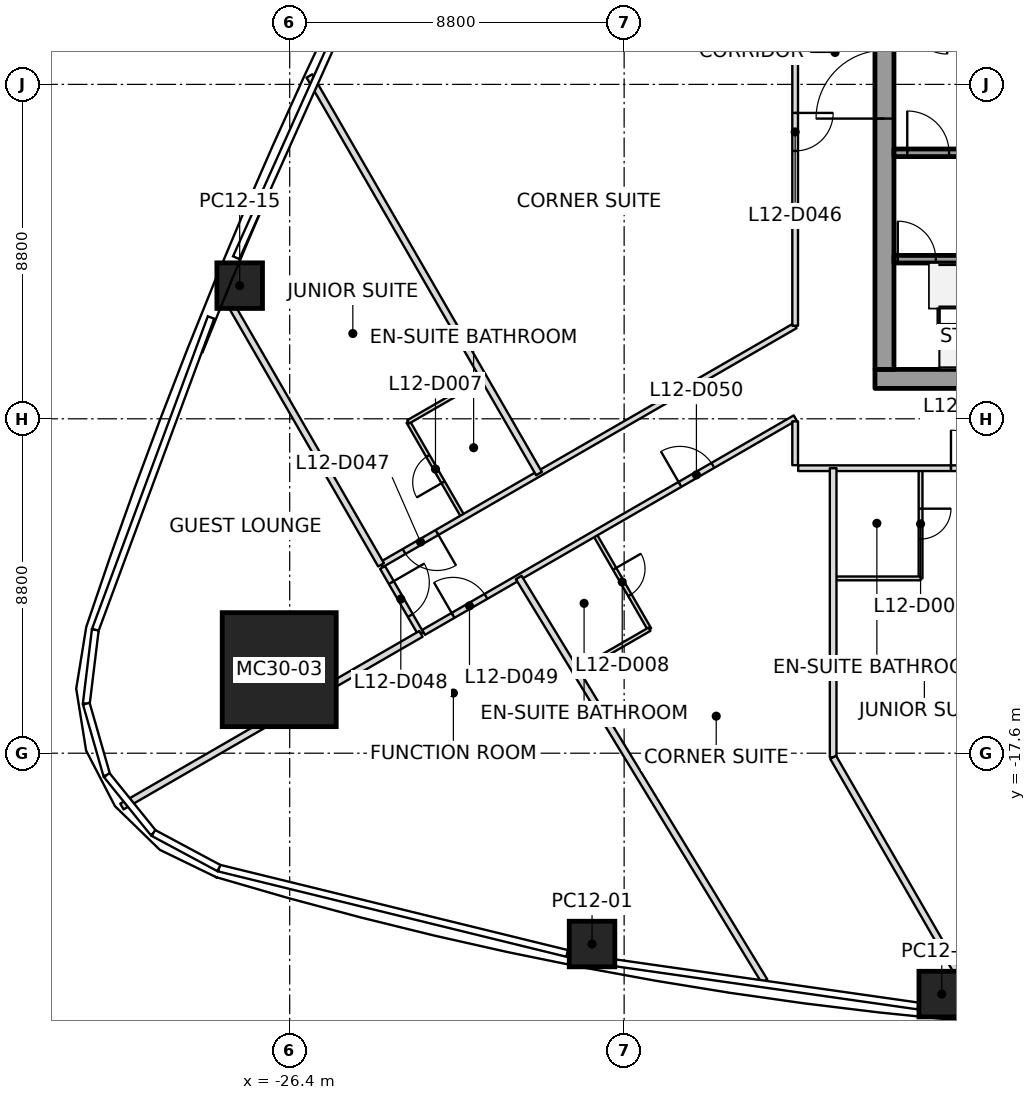
"""IFC4 building model, lengths in metres.
Left out: names, types, materials, properties, quantities, classifications, styles, units other than length and angle.
Written with IfcOpenShell. Run it as: python <this file> out.ifc"""

import sys

from ifc_helpers import new_model, si_unit, direction, frame, frame_2d, origin, origin_2d, place, context, subcontext, project, spatial, rectangle, extrude, clip, halfspace, element, fill, save


model = new_model("IFC4")
c1 = context("Model", 3, precision=1e-05, world=origin(), true_north=direction((0.0, 1.0)))
c2 = subcontext(c1, "Body", "Model", "MODEL_VIEW")
j1 = project(units=[si_unit("LENGTHUNIT", "METRE"), si_unit("PLANEANGLEUNIT", "RADIAN")], contexts=[c1])
p1 = place(None, origin())
s1 = spatial("IfcSite", under=j1, at=p1, CompositionType="ELEMENT")
p2 = place(p1, origin())
s2 = spatial("IfcBuilding", under=s1, at=p2, CompositionType="ELEMENT")
p3 = place(p2, frame((0.0, 0.0, 66.5)))
s3 = spatial("IfcBuildingStorey", under=s2, at=p3, CompositionType="ELEMENT", Elevation=66.5)
p4 = place(p3, frame((-26.676, -15.401, 0.0), z_axis=(0.030531956516, 0.017672925154, 0.999377539946), x_axis=(0.99953379114, -0.000539840661, -0.030527183636)))
e1 = element("IfcColumn", 1, at=p4, inside=s3, PredefinedType="COLUMN", context=c2, shape_type="SweptSolid", body=[
    extrude(rectangle(XDim=3.0, YDim=3.0, at=origin_2d()), origin(), (0.0, 0.0, 1.0), 3.702),
])
p5 = place(p3, frame((-18.445, -22.622, 0.0), z_axis=(0.019018956694, 0.15899066195, 0.987096879085), x_axis=(-0.981890485807, 0.189097653635, -0.011539119147)))
e2 = element("IfcColumn", 2, at=p5, inside=s3, PredefinedType="COLUMN", context=c2, shape_type="SweptSolid", body=[
    clip(clip(extrude(rectangle(XDim=1.2, YDim=1.2, at=origin_2d()), origin(), (0.0, 0.0, 1.0), 3.748), halfspace(frame((0.0, 0.0, 0.006)), True)), halfspace(frame((0.0, 0.0, 3.734)), False)),
])
p6 = place(p3, frame((-9.242, -23.939, 0.0), z_axis=(0.00942953432, 0.204607977573, 0.978798579584), x_axis=(0.990215317111, -0.138199898552, 0.019349775144)))
e3 = element("IfcColumn", 3, at=p6, inside=s3, PredefinedType="COLUMN", context=c2, shape_type="SweptSolid", body=[
    clip(clip(extrude(rectangle(XDim=1.2, YDim=1.2, at=origin_2d()), origin(), (0.0, 0.0, 1.0), 3.78), halfspace(frame((0.0, 0.0, 0.007)), True)), halfspace(frame((0.0, 0.0, 3.762)), False)),
])
p7 = place(p3, frame((-27.716, -5.296, 0.0), z_axis=(0.019460655113, 0.011016709844, 0.999749926235), x_axis=(0.381436993844, 0.924227098821, -0.017609359201)))
e4 = element("IfcColumn", 4, at=p7, inside=s3, PredefinedType="COLUMN", context=c2, shape_type="SweptSolid", body=[
    extrude(rectangle(XDim=1.2, YDim=1.2, at=origin_2d()), origin(), (0.0, 0.0, 1.0), 3.701),
])
p8 = place(p3, frame((-11.0, -7.75, 0.0), z_axis=(0.0, 0.0, 1.0), x_axis=(1.0, 0.0, 0.0)))
e5 = element("IfcWall", 5, at=p8, inside=s3, PredefinedType="SHEAR", context=c2, shape_type="SweptSolid", body=[
    extrude(rectangle(XDim=22.0, YDim=0.5, at=frame_2d((11.0, 0.0))), origin(), (0.0, 0.0, 1.0), 3.7),
])
p9 = place(p8, frame((10.45, 0.0, 0.0)))
e6 = element("IfcOpeningElement", 6, at=p9, cuts=e5, PredefinedType="OPENING", context=c2, shape_type="SweptSolid", body=[
    extrude(rectangle(XDim=1.1, YDim=2.1, at=frame_2d((0.55, 1.05))), frame((0.0, 0.25, 0.0), z_axis=(0.0, -1.0, 0.0), x_axis=(1.0, 0.0, 0.0)), (0.0, 0.0, 1.0), 0.5),
])
p10 = place(p3, frame((-10.75, -7.5, 0.0), z_axis=(0.0, 0.0, 1.0), x_axis=(0.0, 1.0, 0.0)))
e7 = element("IfcWall", 7, at=p10, inside=s3, PredefinedType="SHEAR", context=c2, shape_type="SweptSolid", body=[
    extrude(rectangle(XDim=15.0, YDim=0.5, at=frame_2d((7.5, 0.0))), origin(), (0.0, 0.0, 1.0), 3.7),
])
p11 = place(p10, frame((6.6, 0.0, 0.0)))
e8 = element("IfcOpeningElement", 8, at=p11, cuts=e7, PredefinedType="OPENING", context=c2, shape_type="SweptSolid", body=[
    extrude(rectangle(XDim=1.8, YDim=2.1, at=frame_2d((0.9, 1.05))), frame((0.0, 0.25, 0.0), z_axis=(0.0, -1.0, 0.0), x_axis=(1.0, 0.0, 0.0)), (0.0, 0.0, 1.0), 0.5),
])
p12 = place(p3, frame((-10.5, -4.6, 0.0), z_axis=(0.0, 0.0, 1.0), x_axis=(1.0, 0.0, 0.0)))
e9 = element("IfcWall", 9, at=p12, inside=s3, PredefinedType="SOLIDWALL", context=c2, shape_type="SweptSolid", body=[
    extrude(rectangle(XDim=1.8, YDim=0.2, at=frame_2d((0.9, 0.0))), origin(), (0.0, 0.0, 1.0), 3.55),
])
p13 = place(p12, frame((0.1, 0.0, 0.0)))
e10 = element("IfcOpeningElement", 10, at=p13, cuts=e9, PredefinedType="OPENING", context=c2, shape_type="SweptSolid", body=[
    extrude(rectangle(XDim=1.0, YDim=2.1, at=frame_2d((0.5, 1.05))), frame((0.0, 0.1, 0.0), z_axis=(0.0, -1.0, 0.0), x_axis=(1.0, 0.0, 0.0)), (0.0, 0.0, 1.0), 0.2),
])
p14 = place(p3, frame((-10.5, -1.8, 0.0), z_axis=(0.0, 0.0, 1.0), x_axis=(1.0, 0.0, 0.0)))
e11 = element("IfcWall", 11, at=p14, inside=s3, PredefinedType="SOLIDWALL", context=c2, shape_type="SweptSolid", body=[
    extrude(rectangle(XDim=1.8, YDim=0.2, at=frame_2d((0.9, 0.0))), origin(), (0.0, 0.0, 1.0), 3.55),
])
p15 = place(p14, frame((0.35, 0.0, 0.0)))
e12 = element("IfcOpeningElement", 12, at=p15, cuts=e11, PredefinedType="OPENING", context=c2, shape_type="SweptSolid", body=[
    extrude(rectangle(XDim=1.1, YDim=2.1, at=frame_2d((0.55, 1.05))), frame((0.0, 0.1, 0.0), z_axis=(0.0, -1.0, 0.0), x_axis=(1.0, 0.0, 0.0)), (0.0, 0.0, 1.0), 0.2),
])
p16 = place(p3, frame((-22.947, -14.461, 0.0), z_axis=(0.0, 0.0, 1.0), x_axis=(-0.866030311917, -0.499991498769, 0.0)))
e13 = element("IfcWall", 13, at=p16, inside=s3, PredefinedType="PARTITIONING", context=c2, shape_type="SweptSolid", body=[
    extrude(rectangle(XDim=9.086, YDim=0.175, at=frame_2d((4.543, 0.0))), origin(), (0.0, 0.0, 1.0), 2.934),
])
p17 = place(p3, frame((-23.997, -12.642, 0.0), z_axis=(0.0, 0.0, 1.0), x_axis=(-0.49999045727, 0.866030913212, 0.0)))
e14 = element("IfcWall", 14, at=p17, inside=s3, PredefinedType="PARTITIONING", context=c2, shape_type="SweptSolid", body=[
    extrude(rectangle(XDim=8.543, YDim=0.175, at=frame_2d((4.271, 0.0))), origin(), (0.0, 0.0, 1.0), 2.934),
])
p18 = place(p3, frame((-19.84, -10.242, 0.0), z_axis=(0.0, 0.0, 1.0), x_axis=(-0.499991787927, 0.866030144975, 0.0)))
e15 = element("IfcWall", 15, at=p18, inside=s3, PredefinedType="PARTITIONING", context=c2, shape_type="SweptSolid", body=[
    extrude(rectangle(XDim=12.084, YDim=0.175, at=frame_2d((6.042, 0.0))), origin(), (0.0, 0.0, 1.0), 2.934),
])
p19 = place(p3, frame((-13.908, -23.596, 0.0), z_axis=(0.0, 0.0, 1.0), x_axis=(-0.520049098653, 0.854136367912, 0.0)))
e16 = element("IfcWall", 16, at=p19, inside=s3, PredefinedType="PARTITIONING", context=c2, shape_type="SweptSolid", body=[
    extrude(rectangle(XDim=12.434, YDim=0.175, at=frame_2d((6.217, 0.0))), origin(), (0.0, 0.0, 1.0), 2.934),
])
p20 = place(p3, frame((-12.1, -10.1, 0.0), z_axis=(0.0, 0.0, 1.0), x_axis=(0.0, -1.0, 0.0)))
e17 = element("IfcWall", 17, at=p20, inside=s3, PredefinedType="PARTITIONING", context=c2, shape_type="SweptSolid", body=[
    extrude(rectangle(XDim=7.608, YDim=0.175, at=frame_2d((3.804, 0.0))), origin(), (0.0, 0.0, 1.0), 3.15),
])
p21 = place(p3, frame((-12.1, -17.708, 0.0), z_axis=(0.0, 0.0, 1.0), x_axis=(0.500006299954, -0.866021766474, 0.0)))
e18 = element("IfcWall", 18, at=p21, inside=s3, PredefinedType="PARTITIONING", context=c2, shape_type="SweptSolid", body=[
    extrude(rectangle(XDim=7.917, YDim=0.175, at=frame_2d((3.958, 0.0))), origin(), (0.0, 0.0, 1.0), 3.15),
])
p22 = place(p3, frame((-13.1, -6.351, 0.0), z_axis=(0.0, 0.0, 1.0), x_axis=(-0.86601949893, -0.500010227369, 0.0)))
e19 = element("IfcWall", 19, at=p22, inside=s3, PredefinedType="PARTITIONING", context=c2, shape_type="SweptSolid", body=[
    extrude(rectangle(XDim=12.582, YDim=0.15, at=frame_2d((6.291, 0.0))), origin(), (0.0, 0.0, 1.0), 2.947),
])
p23 = place(p22, frame((10.882, 0.0, 0.0)))
e20 = element("IfcOpeningElement", 20, at=p23, cuts=e19, PredefinedType="OPENING", context=c2, shape_type="SweptSolid", body=[
    extrude(rectangle(XDim=1.0, YDim=2.1, at=frame_2d((0.5, 1.05))), frame((0.0, 0.075, 0.0), z_axis=(0.0, -1.0, 0.0), x_axis=(1.0, 0.0, 0.0)), (0.0, 0.0, 1.0), 0.15),
])
p24 = place(p3, frame((-23.957, -12.711, 0.0), z_axis=(0.0, 0.0, 1.0), x_axis=(0.499973530083, -0.866040685659, 0.0)))
e21 = element("IfcWall", 21, at=p24, inside=s3, PredefinedType="PARTITIONING", context=c2, shape_type="SweptSolid", body=[
    extrude(rectangle(XDim=2.02, YDim=0.15, at=frame_2d((1.01, 0.0))), origin(), (0.0, 0.0, 1.0), 2.797),
])
p25 = place(p24, frame((0.46, 0.0, 0.0)))
e22 = element("IfcOpeningElement", 22, at=p25, cuts=e21, PredefinedType="OPENING", context=c2, shape_type="SweptSolid", body=[
    extrude(rectangle(XDim=1.0, YDim=2.1, at=frame_2d((0.5, 1.05))), frame((0.0, 0.075, 0.0), z_axis=(0.0, -1.0, 0.0), x_axis=(1.0, 0.0, 0.0)), (0.0, 0.0, 1.0), 0.15),
])
p26 = place(p3, frame((-22.877, -14.421, 0.0), z_axis=(0.0, 0.0, 1.0), x_axis=(0.86601740905, 0.500013847031, 0.0)))
e23 = element("IfcWall", 23, at=p26, inside=s3, PredefinedType="PARTITIONING", context=c2, shape_type="SweptSolid", body=[
    extrude(rectangle(XDim=11.29, YDim=0.15, at=frame_2d((5.645, 0.0))), origin(), (0.0, 0.0, 1.0), 2.797),
])
p27 = place(p26, frame((0.895, 0.0, 0.0)))
e24 = element("IfcOpeningElement", 24, at=p27, cuts=e23, PredefinedType="OPENING", context=c2, shape_type="SweptSolid", body=[
    extrude(rectangle(XDim=1.0, YDim=2.1, at=frame_2d((0.5, 1.05))), frame((0.0, 0.075, 0.0), z_axis=(0.0, -1.0, 0.0), x_axis=(1.0, 0.0, 0.0)), (0.0, 0.0, 1.0), 0.15),
])
p28 = place(p26, frame((7.79, 0.0, 0.0)))
e25 = element("IfcOpeningElement", 25, at=p28, cuts=e23, PredefinedType="OPENING", context=c2, shape_type="SweptSolid", body=[
    extrude(rectangle(XDim=1.0, YDim=2.1, at=frame_2d((0.5, 1.05))), frame((0.0, 0.075, 0.0), z_axis=(0.0, -1.0, 0.0), x_axis=(1.0, 0.0, 0.0)), (0.0, 0.0, 1.0), 0.15),
])
p29 = place(p3, frame((-13.1, -8.867, 0.0), z_axis=(0.0, 0.0, 1.0), x_axis=(0.0, -1.0, 0.0)))
e26 = element("IfcWall", 26, at=p29, inside=s3, PredefinedType="PARTITIONING", context=c2, shape_type="SweptSolid", body=[
    extrude(rectangle(XDim=1.153, YDim=0.15, at=frame_2d((0.576, 0.0))), origin(), (0.0, 0.0, 1.0), 2.797),
])
p30 = place(p3, frame((-13.1, 10.02, 0.0), z_axis=(0.0, 0.0, 1.0), x_axis=(0.0, -1.0, 0.0)))
e27 = element("IfcWall", 27, at=p30, inside=s3, PredefinedType="PARTITIONING", context=c2, shape_type="SweptSolid", body=[
    extrude(rectangle(XDim=16.371, YDim=0.15, at=frame_2d((8.186, 0.0))), origin(), (0.0, 0.0, 1.0), 3.017),
])
p31 = place(p30, frame((2.545, 0.0, 0.0)))
e28 = element("IfcOpeningElement", 28, at=p31, cuts=e27, PredefinedType="OPENING", context=c2, shape_type="SweptSolid", body=[
    extrude(rectangle(XDim=1.0, YDim=2.1, at=frame_2d((0.5, 1.05))), frame((0.0, 0.075, 0.0), z_axis=(0.0, -1.0, 0.0), x_axis=(1.0, 0.0, 0.0)), (0.0, 0.0, 1.0), 0.15),
])
p32 = place(p30, frame((10.771, 0.0, 0.0)))
e29 = element("IfcOpeningElement", 29, at=p32, cuts=e27, PredefinedType="OPENING", context=c2, shape_type="SweptSolid", body=[
    extrude(rectangle(XDim=1.0, YDim=2.1, at=frame_2d((0.5, 1.05))), frame((0.0, 0.075, 0.0), z_axis=(0.0, -1.0, 0.0), x_axis=(1.0, 0.0, 0.0)), (0.0, 0.0, 1.0), 0.15),
])
p33 = place(p3, frame((-13.02, -10.1, 0.0), z_axis=(0.0, 0.0, 1.0), x_axis=(1.0, 0.0, 0.0)))
e30 = element("IfcWall", 30, at=p33, inside=s3, PredefinedType="PARTITIONING", context=c2, shape_type="SweptSolid", body=[
    extrude(rectangle(XDim=26.04, YDim=0.15, at=frame_2d((13.02, 0.0))), origin(), (0.0, 0.0, 1.0), 2.947),
])
p34 = place(p33, frame((4.02, 0.0, 0.0)))
e31 = element("IfcOpeningElement", 31, at=p34, cuts=e30, PredefinedType="OPENING", context=c2, shape_type="SweptSolid", body=[
    extrude(rectangle(XDim=1.0, YDim=2.1, at=frame_2d((0.5, 1.05))), frame((0.0, 0.075, 0.0), z_axis=(0.0, -1.0, 0.0), x_axis=(1.0, 0.0, 0.0)), (0.0, 0.0, 1.0), 0.15),
])
p35 = place(p33, frame((7.02, 0.0, 0.0)))
e32 = element("IfcOpeningElement", 32, at=p35, cuts=e30, PredefinedType="OPENING", context=c2, shape_type="SweptSolid", body=[
    extrude(rectangle(XDim=1.0, YDim=2.1, at=frame_2d((0.5, 1.05))), frame((0.0, 0.075, 0.0), z_axis=(0.0, -1.0, 0.0), x_axis=(1.0, 0.0, 0.0)), (0.0, 0.0, 1.0), 0.15),
])
p36 = place(p33, frame((12.12, 0.0, 0.0)))
e33 = element("IfcOpeningElement", 33, at=p36, cuts=e30, PredefinedType="OPENING", context=c2, shape_type="SweptSolid", body=[
    extrude(rectangle(XDim=1.0, YDim=2.1, at=frame_2d((0.5, 1.05))), frame((0.0, 0.075, 0.0), z_axis=(0.0, -1.0, 0.0), x_axis=(1.0, 0.0, 0.0)), (0.0, 0.0, 1.0), 0.15),
])
p37 = place(p33, frame((16.62, 0.0, 0.0)))
e34 = element("IfcOpeningElement", 34, at=p37, cuts=e30, PredefinedType="OPENING", context=c2, shape_type="SweptSolid", body=[
    extrude(rectangle(XDim=1.0, YDim=2.1, at=frame_2d((0.5, 1.05))), frame((0.0, 0.075, 0.0), z_axis=(0.0, -1.0, 0.0), x_axis=(1.0, 0.0, 0.0)), (0.0, 0.0, 1.0), 0.15),
])
p38 = place(p33, frame((19.62, 0.0, 0.0)))
e35 = element("IfcOpeningElement", 35, at=p38, cuts=e30, PredefinedType="OPENING", context=c2, shape_type="SweptSolid", body=[
    extrude(rectangle(XDim=1.0, YDim=2.1, at=frame_2d((0.5, 1.05))), frame((0.0, 0.075, 0.0), z_axis=(0.0, -1.0, 0.0), x_axis=(1.0, 0.0, 0.0)), (0.0, 0.0, 1.0), 0.15),
])
p39 = place(p3, frame((-21.846, -11.366, 0.0), z_axis=(0.0, 0.0, 1.0), x_axis=(-0.500036638401, 0.866004249561, 0.0)))
e36 = element("IfcWall", 36, at=p39, inside=s3, PredefinedType="PARTITIONING", context=c2, shape_type="SweptSolid", body=[
    extrude(rectangle(XDim=2.87, YDim=0.1, at=frame_2d((1.435, 0.0))), origin(), (0.0, 0.0, 1.0), 3.15),
])
p40 = place(p39, frame((1.035, 0.0, 0.0)))
e37 = element("IfcOpeningElement", 37, at=p40, cuts=e36, PredefinedType="OPENING", context=c2, shape_type="SweptSolid", body=[
    extrude(rectangle(XDim=0.8, YDim=2.1, at=frame_2d((0.4, 1.05))), frame((0.0, 0.05, 0.0), z_axis=(0.0, -1.0, 0.0), x_axis=(1.0, 0.0, 0.0)), (0.0, 0.0, 1.0), 0.1),
])
p41 = place(p3, frame((-23.281, -8.881, 0.0), z_axis=(0.0, 0.0, 1.0), x_axis=(0.866017224141, 0.500014167291, 0.0)))
e38 = element("IfcWall", 38, at=p41, inside=s3, PredefinedType="PARTITIONING", context=c2, shape_type="SweptSolid", body=[
    extrude(rectangle(XDim=2.27, YDim=0.1, at=frame_2d((1.135, 0.0))), origin(), (0.0, 0.0, 1.0), 3.15),
])
p42 = place(p3, frame((-18.368, -11.852, 0.0), z_axis=(0.0, 0.0, 1.0), x_axis=(0.500036638401, -0.866004249561, 0.0)))
e39 = element("IfcWall", 39, at=p42, inside=s3, PredefinedType="PARTITIONING", context=c2, shape_type="SweptSolid", body=[
    extrude(rectangle(XDim=2.87, YDim=0.1, at=frame_2d((1.435, 0.0))), origin(), (0.0, 0.0, 1.0), 3.15),
])
p43 = place(p42, frame((1.035, 0.0, 0.0)))
e40 = element("IfcOpeningElement", 40, at=p43, cuts=e39, PredefinedType="OPENING", context=c2, shape_type="SweptSolid", body=[
    extrude(rectangle(XDim=0.8, YDim=2.1, at=frame_2d((0.4, 1.05))), frame((0.0, 0.05, 0.0), z_axis=(0.0, -1.0, 0.0), x_axis=(1.0, 0.0, 0.0)), (0.0, 0.0, 1.0), 0.1),
])
p44 = place(p3, frame((-16.933, -14.337, 0.0), z_axis=(0.0, 0.0, 1.0), x_axis=(-0.866017224141, -0.500014167291, 0.0)))
e41 = element("IfcWall", 41, at=p44, inside=s3, PredefinedType="PARTITIONING", context=c2, shape_type="SweptSolid", body=[
    extrude(rectangle(XDim=2.27, YDim=0.1, at=frame_2d((1.135, 0.0))), origin(), (0.0, 0.0, 1.0), 3.15),
])
p45 = place(p3, frame((-9.8, -10.13, 0.0), z_axis=(0.0, 0.0, 1.0), x_axis=(0.0, -1.0, 0.0)))
e42 = element("IfcWall", 42, at=p45, inside=s3, PredefinedType="PARTITIONING", context=c2, shape_type="SweptSolid", body=[
    extrude(rectangle(XDim=2.87, YDim=0.1, at=frame_2d((1.435, 0.0))), origin(), (0.0, 0.0, 1.0), 3.15),
])
p46 = place(p45, frame((1.035, 0.0, 0.0)))
e43 = element("IfcOpeningElement", 43, at=p46, cuts=e42, PredefinedType="OPENING", context=c2, shape_type="SweptSolid", body=[
    extrude(rectangle(XDim=0.8, YDim=2.1, at=frame_2d((0.4, 1.05))), frame((0.0, 0.05, 0.0), z_axis=(0.0, -1.0, 0.0), x_axis=(1.0, 0.0, 0.0)), (0.0, 0.0, 1.0), 0.1),
])
p47 = place(p3, frame((-9.8, -13.0, 0.0), z_axis=(0.0, 0.0, 1.0), x_axis=(-1.0, 0.0, 0.0)))
e44 = element("IfcWall", 44, at=p47, inside=s3, PredefinedType="PARTITIONING", context=c2, shape_type="SweptSolid", body=[
    extrude(rectangle(XDim=2.27, YDim=0.1, at=frame_2d((1.135, 0.0))), origin(), (0.0, 0.0, 1.0), 3.15),
])
p48 = place(p32, origin())
e45 = element("IfcDoor", 45, at=p48, inside=s3, OperationType="SINGLE_SWING_LEFT", PredefinedType="DOOR", context=c2, shape_type="SweptSolid", body=[
    extrude(rectangle(XDim=1.0, YDim=2.1, at=frame_2d((0.5, 1.05))), frame((0.0, 0.025, 0.0), z_axis=(0.0, -1.0, 0.0), x_axis=(1.0, 0.0, 0.0)), (0.0, 0.0, 1.0), 0.05),
])
fill(e29, e45)
p49 = place(p23, origin())
e46 = element("IfcDoor", 46, at=p49, inside=s3, OperationType="SINGLE_SWING_LEFT", PredefinedType="DOOR", context=c2, shape_type="SweptSolid", body=[
    extrude(rectangle(XDim=1.0, YDim=2.1, at=frame_2d((0.5, 1.05))), frame((0.0, 0.025, 0.0), z_axis=(0.0, -1.0, 0.0), x_axis=(1.0, 0.0, 0.0)), (0.0, 0.0, 1.0), 0.05),
])
fill(e20, e46)
p50 = place(p40, origin())
e47 = element("IfcDoor", 47, at=p50, inside=s3, OperationType="SINGLE_SWING_RIGHT", PredefinedType="DOOR", context=c2, shape_type="SweptSolid", body=[
    extrude(rectangle(XDim=0.8, YDim=2.1, at=frame_2d((0.4, 1.05))), frame((0.0, 0.025, 0.0), z_axis=(0.0, -1.0, 0.0), x_axis=(1.0, 0.0, 0.0)), (0.0, 0.0, 1.0), 0.05),
])
fill(e37, e47)
p51 = place(p25, origin())
e48 = element("IfcDoor", 48, at=p51, inside=s3, OperationType="SINGLE_SWING_LEFT", PredefinedType="DOOR", context=c2, shape_type="SweptSolid", body=[
    extrude(rectangle(XDim=1.0, YDim=2.1, at=frame_2d((0.5, 1.05))), frame((0.0, 0.025, 0.0), z_axis=(0.0, -1.0, 0.0), x_axis=(1.0, 0.0, 0.0)), (0.0, 0.0, 1.0), 0.05),
])
fill(e22, e48)
p52 = place(p27, origin())
e49 = element("IfcDoor", 49, at=p52, inside=s3, OperationType="SINGLE_SWING_LEFT", PredefinedType="DOOR", context=c2, shape_type="SweptSolid", body=[
    extrude(rectangle(XDim=1.0, YDim=2.1, at=frame_2d((0.5, 1.05))), frame((0.0, 0.025, 0.0), z_axis=(0.0, -1.0, 0.0), x_axis=(1.0, 0.0, 0.0)), (0.0, 0.0, 1.0), 0.05),
])
fill(e24, e49)
p53 = place(p28, origin())
e50 = element("IfcDoor", 50, at=p53, inside=s3, OperationType="SINGLE_SWING_LEFT", PredefinedType="DOOR", context=c2, shape_type="SweptSolid", body=[
    extrude(rectangle(XDim=1.0, YDim=2.1, at=frame_2d((0.5, 1.05))), frame((0.0, 0.025, 0.0), z_axis=(0.0, -1.0, 0.0), x_axis=(1.0, 0.0, 0.0)), (0.0, 0.0, 1.0), 0.05),
])
fill(e25, e50)
p54 = place(p43, origin())
e51 = element("IfcDoor", 51, at=p54, inside=s3, OperationType="SINGLE_SWING_RIGHT", PredefinedType="DOOR", context=c2, shape_type="SweptSolid", body=[
    extrude(rectangle(XDim=0.8, YDim=2.1, at=frame_2d((0.4, 1.05))), frame((0.0, 0.025, 0.0), z_axis=(0.0, -1.0, 0.0), x_axis=(1.0, 0.0, 0.0)), (0.0, 0.0, 1.0), 0.05),
])
fill(e40, e51)
p55 = place(p34, origin())
e52 = element("IfcDoor", 52, at=p55, inside=s3, OperationType="SINGLE_SWING_LEFT", PredefinedType="DOOR", context=c2, shape_type="SweptSolid", body=[
    extrude(rectangle(XDim=1.0, YDim=2.1, at=frame_2d((0.5, 1.05))), frame((0.0, 0.025, 0.0), z_axis=(0.0, -1.0, 0.0), x_axis=(1.0, 0.0, 0.0)), (0.0, 0.0, 1.0), 0.05),
])
fill(e31, e52)
p56 = place(p46, origin())
e53 = element("IfcDoor", 53, at=p56, inside=s3, OperationType="SINGLE_SWING_LEFT", PredefinedType="DOOR", context=c2, shape_type="SweptSolid", body=[
    extrude(rectangle(XDim=0.8, YDim=2.1, at=frame_2d((0.4, 1.05))), frame((0.0, 0.025, 0.0), z_axis=(0.0, -1.0, 0.0), x_axis=(1.0, 0.0, 0.0)), (0.0, 0.0, 1.0), 0.05),
])
fill(e43, e53)
p57 = place(p15, origin())
e54 = element("IfcDoor", 54, at=p57, inside=s3, OperationType="SINGLE_SWING_RIGHT", PredefinedType="DOOR", context=c2, shape_type="SweptSolid", body=[
    extrude(rectangle(XDim=1.1, YDim=2.1, at=frame_2d((0.55, 1.05))), frame((0.0, 0.025, 0.0), z_axis=(0.0, -1.0, 0.0), x_axis=(1.0, 0.0, 0.0)), (0.0, 0.0, 1.0), 0.05),
])
fill(e12, e54)
p58 = place(p13, origin())
e55 = element("IfcDoor", 55, at=p58, inside=s3, OperationType="SINGLE_SWING_LEFT", PredefinedType="DOOR", context=c2, shape_type="SweptSolid", body=[
    extrude(rectangle(XDim=1.0, YDim=2.1, at=frame_2d((0.5, 1.05))), frame((0.0, 0.025, 0.0), z_axis=(0.0, -1.0, 0.0), x_axis=(1.0, 0.0, 0.0)), (0.0, 0.0, 1.0), 0.05),
])
fill(e10, e55)
p59 = place(p11, origin())
e56 = element("IfcDoor", 56, at=p59, inside=s3, OperationType="DOUBLE_DOOR_SINGLE_SWING", PredefinedType="DOOR", context=c2, shape_type="SweptSolid", body=[
    extrude(rectangle(XDim=1.8, YDim=2.1, at=frame_2d((0.9, 1.05))), frame((0.0, 0.025, 0.0), z_axis=(0.0, -1.0, 0.0), x_axis=(1.0, 0.0, 0.0)), (0.0, 0.0, 1.0), 0.05),
])
fill(e8, e56)
save(model, sys.argv[1])
